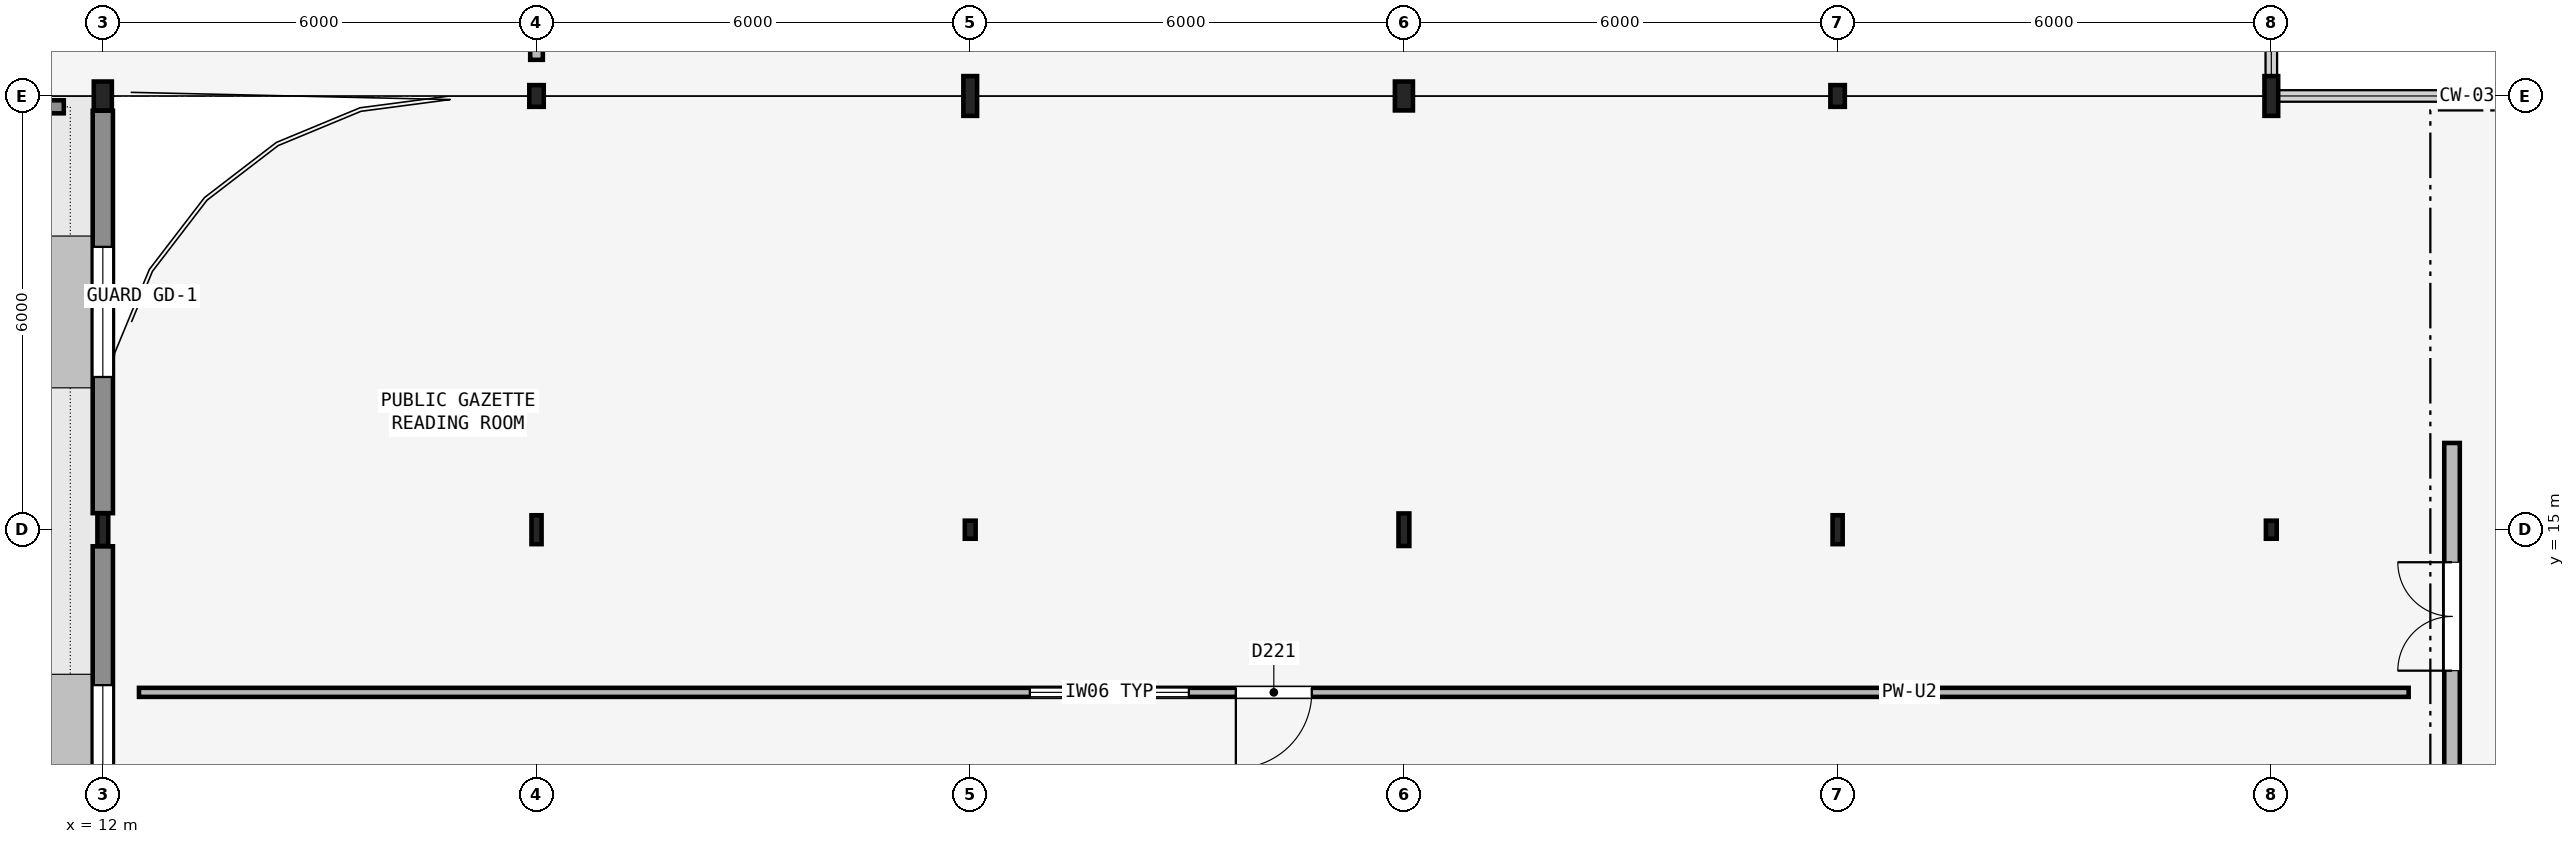
"""IFC4 building model, lengths in metres.
Left out: names, types, materials, properties, quantities, classifications, styles, units other than length and angle.
Written with IfcOpenShell. Run it as: python <this file> out.ifc"""

import sys

from ifc_helpers import new_model, si_unit, direction, frame, frame_2d, origin, origin_2d, place, context, subcontext, project, spatial, rectangle, hollow_rectangle, i_section, extrude, element, fill, save


model = new_model("IFC4")
c1 = context("Model", 3, precision=1e-05, world=origin(), true_north=direction((0.0, 1.0)))
c2 = subcontext(c1, "Body", "Model", "MODEL_VIEW")
j1 = project(units=[si_unit("LENGTHUNIT", "METRE"), si_unit("PLANEANGLEUNIT", "RADIAN")], contexts=[c1])
p1 = place(None, origin())
s1 = spatial("IfcSite", under=j1, at=p1, CompositionType="ELEMENT")
p2 = place(p1, origin())
s2 = spatial("IfcBuilding", under=s1, at=p2, CompositionType="ELEMENT")
p3 = place(p2, frame((0.0, 0.0, 9.3)))
s3 = spatial("IfcBuildingStorey", under=s2, at=p3, CompositionType="ELEMENT", Elevation=9.3)
p4 = place(p3, frame((12.0, 15.0, 0.0), z_axis=(0.0, 0.0, 1.0), x_axis=(1.0, 0.0, 0.0)))
e1 = element("IfcColumn", 1, at=p4, inside=s3, PredefinedType="COLUMN", context=c2, shape_type="SweptSolid", body=[
    extrude(i_section(OverallWidth=0.15, OverallDepth=0.45, WebThickness=0.01, FlangeThickness=0.017, FilletRadius=0.015, at=origin_2d()), origin(), (0.0, 0.0, 1.0), 4.2),
])
p5 = place(p3, frame((12.0, 21.0, 0.0), z_axis=(0.0, 0.0, 1.0), x_axis=(1.0, 0.0, 0.0)))
e2 = element("IfcColumn", 2, at=p5, inside=s3, PredefinedType="COLUMN", context=c2, shape_type="SweptSolid", body=[
    extrude(i_section(OverallWidth=0.25, OverallDepth=0.4, WebThickness=0.01, FlangeThickness=0.013, FilletRadius=0.014, at=origin_2d()), origin(), (0.0, 0.0, 1.0), 4.2),
])
p6 = place(p3, frame((18.0, 15.0, 0.0), z_axis=(0.0, 0.0, 1.0), x_axis=(1.0, 0.0, 0.0)))
e3 = element("IfcColumn", 3, at=p6, inside=s3, PredefinedType="COLUMN", context=c2, shape_type="SweptSolid", body=[
    extrude(i_section(OverallWidth=0.14, OverallDepth=0.4, WebThickness=0.009, FlangeThickness=0.016, FilletRadius=0.014, at=origin_2d()), origin(), (0.0, 0.0, 1.0), 4.2),
])
p7 = place(p3, frame((18.0, 21.0, 0.0), z_axis=(0.0, 0.0, 1.0), x_axis=(1.0, 0.0, 0.0)))
e4 = element("IfcColumn", 4, at=p7, inside=s3, PredefinedType="COLUMN", context=c2, shape_type="SweptSolid", body=[
    extrude(hollow_rectangle(XDim=0.2, YDim=0.3, WallThickness=0.012, InnerFilletRadius=0.012, OuterFilletRadius=0.024, at=origin_2d()), origin(), (0.0, 0.0, 1.0), 4.2),
])
p8 = place(p3, frame((24.0, 15.0, 0.0), z_axis=(0.0, 0.0, 1.0), x_axis=(1.0, 0.0, 0.0)))
e5 = element("IfcColumn", 5, at=p8, inside=s3, PredefinedType="COLUMN", context=c2, shape_type="SweptSolid", body=[
    extrude(hollow_rectangle(XDim=0.15, YDim=0.25, WallThickness=0.01, InnerFilletRadius=0.01, OuterFilletRadius=0.02, at=origin_2d()), origin(), (0.0, 0.0, 1.0), 4.2),
])
p9 = place(p3, frame((24.0, 21.0, 0.0), z_axis=(0.0, 0.0, 1.0), x_axis=(1.0, 0.0, 0.0)))
e6 = element("IfcColumn", 6, at=p9, inside=s3, PredefinedType="COLUMN", context=c2, shape_type="SweptSolid", body=[
    extrude(i_section(OverallWidth=0.19, OverallDepth=0.55, WebThickness=0.011, FlangeThickness=0.019, FilletRadius=0.018, at=origin_2d()), origin(), (0.0, 0.0, 1.0), 4.2),
])
p10 = place(p3, frame((30.0, 15.0, 0.0), z_axis=(0.0, 0.0, 1.0), x_axis=(1.0, 0.0, 0.0)))
e7 = element("IfcColumn", 7, at=p10, inside=s3, PredefinedType="COLUMN", context=c2, shape_type="SweptSolid", body=[
    extrude(i_section(OverallWidth=0.15, OverallDepth=0.45, WebThickness=0.01, FlangeThickness=0.017, FilletRadius=0.015, at=origin_2d()), origin(), (0.0, 0.0, 1.0), 4.2),
])
p11 = place(p3, frame((30.0, 21.0, 0.0), z_axis=(0.0, 0.0, 1.0), x_axis=(1.0, 0.0, 0.0)))
e8 = element("IfcColumn", 8, at=p11, inside=s3, PredefinedType="COLUMN", context=c2, shape_type="SweptSolid", body=[
    extrude(i_section(OverallWidth=0.25, OverallDepth=0.4, WebThickness=0.01, FlangeThickness=0.013, FilletRadius=0.014, at=origin_2d()), origin(), (0.0, 0.0, 1.0), 4.2),
])
p12 = place(p3, frame((36.0, 15.0, 0.0), z_axis=(0.0, 0.0, 1.0), x_axis=(1.0, 0.0, 0.0)))
e9 = element("IfcColumn", 9, at=p12, inside=s3, PredefinedType="COLUMN", context=c2, shape_type="SweptSolid", body=[
    extrude(i_section(OverallWidth=0.14, OverallDepth=0.4, WebThickness=0.009, FlangeThickness=0.016, FilletRadius=0.014, at=origin_2d()), origin(), (0.0, 0.0, 1.0), 4.2),
])
p13 = place(p3, frame((36.0, 21.0, 0.0), z_axis=(0.0, 0.0, 1.0), x_axis=(1.0, 0.0, 0.0)))
e10 = element("IfcColumn", 10, at=p13, inside=s3, PredefinedType="COLUMN", context=c2, shape_type="SweptSolid", body=[
    extrude(hollow_rectangle(XDim=0.2, YDim=0.3, WallThickness=0.012, InnerFilletRadius=0.012, OuterFilletRadius=0.024, at=origin_2d()), origin(), (0.0, 0.0, 1.0), 4.2),
])
p14 = place(p3, frame((42.0, 15.0, 0.0), z_axis=(0.0, 0.0, 1.0), x_axis=(1.0, 0.0, 0.0)))
e11 = element("IfcColumn", 11, at=p14, inside=s3, PredefinedType="COLUMN", context=c2, shape_type="SweptSolid", body=[
    extrude(hollow_rectangle(XDim=0.15, YDim=0.25, WallThickness=0.01, InnerFilletRadius=0.01, OuterFilletRadius=0.02, at=origin_2d()), origin(), (0.0, 0.0, 1.0), 4.2),
])
p15 = place(p3, frame((42.0, 21.0, 0.0), z_axis=(0.0, 0.0, 1.0), x_axis=(1.0, 0.0, 0.0)))
e12 = element("IfcColumn", 12, at=p15, inside=s3, PredefinedType="COLUMN", context=c2, shape_type="SweptSolid", body=[
    extrude(i_section(OverallWidth=0.19, OverallDepth=0.55, WebThickness=0.011, FlangeThickness=0.019, FilletRadius=0.018, at=origin_2d()), origin(), (0.0, 0.0, 1.0), 4.2),
])
p16 = place(p3, frame((12.0, 9.129, 0.0), z_axis=(0.0, 0.0, 1.0), x_axis=(0.0, 1.0, 0.0)))
e13 = element("IfcWall", 13, at=p16, inside=s3, PredefinedType="SOLIDWALL", context=c2, shape_type="SweptSolid", body=[
    extrude(rectangle(XDim=5.642, YDim=0.28, at=frame_2d((2.821, 0.0))), origin(), (0.0, 0.0, 1.0), 3.39),
])
p17 = place(p16, frame((1.921, 0.0, 1.1)))
e14 = element("IfcOpeningElement", 14, at=p17, cuts=e13, PredefinedType="OPENING", context=c2, shape_type="SweptSolid", body=[
    extrude(rectangle(XDim=1.8, YDim=1.2, at=frame_2d((0.9, 0.6))), frame((0.0, 0.15, 0.0), z_axis=(0.0, -1.0, 0.0), x_axis=(1.0, 0.0, 0.0)), (0.0, 0.0, 1.0), 0.3),
])
p18 = place(p3, frame((12.0, 15.229, 0.0), z_axis=(0.0, 0.0, 1.0), x_axis=(0.0, 1.0, 0.0)))
e15 = element("IfcWall", 15, at=p18, inside=s3, PredefinedType="SOLIDWALL", context=c2, shape_type="SweptSolid", body=[
    extrude(rectangle(XDim=5.567, YDim=0.28, at=frame_2d((2.783, 0.0))), origin(), (0.0, 0.0, 1.0), 3.39),
])
p19 = place(p18, frame((1.884, 0.0, 1.1)))
e16 = element("IfcOpeningElement", 16, at=p19, cuts=e15, PredefinedType="OPENING", context=c2, shape_type="SweptSolid", body=[
    extrude(rectangle(XDim=1.8, YDim=1.2, at=frame_2d((0.9, 0.6))), frame((0.0, 0.15, 0.0), z_axis=(0.0, -1.0, 0.0), x_axis=(1.0, 0.0, 0.0)), (0.0, 0.0, 1.0), 0.3),
])
p20 = place(p3, frame((11.46, 20.85, 0.0), z_axis=(0.0, 0.0, 1.0), x_axis=(-1.0, 0.0, 0.0)))
e17 = element("IfcWall", 17, at=p20, inside=s3, PredefinedType="PARAPET", context=c2, shape_type="SweptSolid", body=[
    extrude(rectangle(XDim=7.02, YDim=0.18, at=frame_2d((3.51, 0.0))), origin(), (0.0, 0.0, 1.0), 1.1),
])
p21 = place(p3, frame((44.5, 11.4, 0.0), z_axis=(0.0, 0.0, 1.0), x_axis=(0.0, 1.0, 0.0)))
e18 = element("IfcWall", 18, at=p21, inside=s3, PredefinedType="PARTITIONING", context=c2, shape_type="SweptSolid", body=[
    extrude(rectangle(XDim=4.8, YDim=0.215, at=frame_2d((2.4, 0.0))), origin(), (0.0, 0.0, 1.0), 3.44),
])
p22 = place(p21, frame((1.65, 0.0, 0.0)))
e19 = element("IfcOpeningElement", 19, at=p22, cuts=e18, PredefinedType="OPENING", context=c2, shape_type="SweptSolid", body=[
    extrude(rectangle(XDim=1.5, YDim=2.15, at=frame_2d((0.75, 1.075))), frame((0.0, 0.117, 0.0), z_axis=(0.0, -1.0, 0.0), x_axis=(1.0, 0.0, 0.0)), (0.0, 0.0, 1.0), 0.235),
])
p23 = place(p3, frame((43.9, 12.75, 0.0), z_axis=(0.0, 0.0, 1.0), x_axis=(-1.0, 0.0, 0.0)))
e20 = element("IfcWall", 20, at=p23, inside=s3, PredefinedType="PARTITIONING", context=c2, shape_type="SweptSolid", body=[
    extrude(rectangle(XDim=31.4, YDim=0.125, at=frame_2d((15.7, 0.0))), origin(), (0.0, 0.0, 1.0), 3.49),
])
p24 = place(p23, frame((15.175, 0.0, 0.0)))
e21 = element("IfcOpeningElement", 21, at=p24, cuts=e20, PredefinedType="OPENING", context=c2, shape_type="SweptSolid", body=[
    extrude(rectangle(XDim=1.05, YDim=2.2, at=frame_2d((0.525, 1.1))), frame((0.0, 0.073, 0.0), z_axis=(0.0, -1.0, 0.0), x_axis=(1.0, 0.0, 0.0)), (0.0, 0.0, 1.0), 0.145),
])
p25 = place(p23, frame((16.875, 0.0, 0.9)))
e22 = element("IfcOpeningElement", 22, at=p25, cuts=e20, PredefinedType="OPENING", context=c2, shape_type="SweptSolid", body=[
    extrude(rectangle(XDim=2.2, YDim=1.4, at=frame_2d((1.1, 0.7))), frame((0.0, 0.073, 0.0), z_axis=(0.0, -1.0, 0.0), x_axis=(1.0, 0.0, 0.0)), (0.0, 0.0, 1.0), 0.145),
])
p26 = place(p3, frame((18.0, 21.5, 0.0), z_axis=(0.0, 0.0, 1.0), x_axis=(0.0, 1.0, 0.0)))
e23 = element("IfcWall", 23, at=p26, inside=s3, PredefinedType="PARTITIONING", context=c2, shape_type="SweptSolid", body=[
    extrude(rectangle(XDim=17.0, YDim=0.175, at=frame_2d((8.5, 0.0))), origin(), (0.0, 0.0, 1.0), 3.29),
])
p27 = place(p26, frame((7.8, 0.0, 0.0)))
e24 = element("IfcOpeningElement", 24, at=p27, cuts=e23, PredefinedType="OPENING", context=c2, shape_type="SweptSolid", body=[
    extrude(rectangle(XDim=1.4, YDim=2.25, at=frame_2d((0.7, 1.125))), frame((0.0, 0.097, 0.0), z_axis=(0.0, -1.0, 0.0), x_axis=(1.0, 0.0, 0.0)), (0.0, 0.0, 1.0), 0.195),
])
p28 = place(p17, origin())
e25 = element("IfcWindow", 25, at=p28, inside=s3, PartitioningType="SINGLE_PANEL", PredefinedType="WINDOW", context=c2, shape_type="SweptSolid", body=[
    extrude(rectangle(XDim=1.8, YDim=1.2, at=frame_2d((0.9, 0.6))), frame((0.0, 0.03, 0.0), z_axis=(0.0, -1.0, 0.0), x_axis=(1.0, 0.0, 0.0)), (0.0, 0.0, 1.0), 0.06),
])
fill(e14, e25)
p29 = place(p19, origin())
e26 = element("IfcWindow", 26, at=p29, inside=s3, PartitioningType="SINGLE_PANEL", PredefinedType="WINDOW", context=c2, shape_type="SweptSolid", body=[
    extrude(rectangle(XDim=1.8, YDim=1.2, at=frame_2d((0.9, 0.6))), frame((0.0, 0.03, 0.0), z_axis=(0.0, -1.0, 0.0), x_axis=(1.0, 0.0, 0.0)), (0.0, 0.0, 1.0), 0.06),
])
fill(e16, e26)
p30 = place(p22, origin())
e27 = element("IfcDoor", 27, at=p30, inside=s3, OperationType="DOUBLE_DOOR_SINGLE_SWING", PredefinedType="DOOR", context=c2, shape_type="SweptSolid", body=[
    extrude(rectangle(XDim=1.5, YDim=2.15, at=frame_2d((0.75, 1.075))), frame((0.0, 0.025, 0.0), z_axis=(0.0, -1.0, 0.0), x_axis=(1.0, 0.0, 0.0)), (0.0, 0.0, 1.0), 0.05),
])
fill(e19, e27)
p31 = place(p24, origin())
e28 = element("IfcDoor", 28, at=p31, inside=s3, OperationType="SINGLE_SWING_RIGHT", PredefinedType="DOOR", context=c2, shape_type="SweptSolid", body=[
    extrude(rectangle(XDim=1.05, YDim=2.2, at=frame_2d((0.525, 1.1))), frame((0.0, 0.025, 0.0), z_axis=(0.0, -1.0, 0.0), x_axis=(1.0, 0.0, 0.0)), (0.0, 0.0, 1.0), 0.05),
])
fill(e21, e28)
p32 = place(p25, origin())
e29 = element("IfcWindow", 29, at=p32, inside=s3, PartitioningType="SINGLE_PANEL", PredefinedType="WINDOW", context=c2, shape_type="SweptSolid", body=[
    extrude(rectangle(XDim=2.2, YDim=1.4, at=frame_2d((1.1, 0.7))), frame((0.0, 0.03, 0.0), z_axis=(0.0, -1.0, 0.0), x_axis=(1.0, 0.0, 0.0)), (0.0, 0.0, 1.0), 0.06),
])
fill(e22, e29)
save(model, sys.argv[1])
